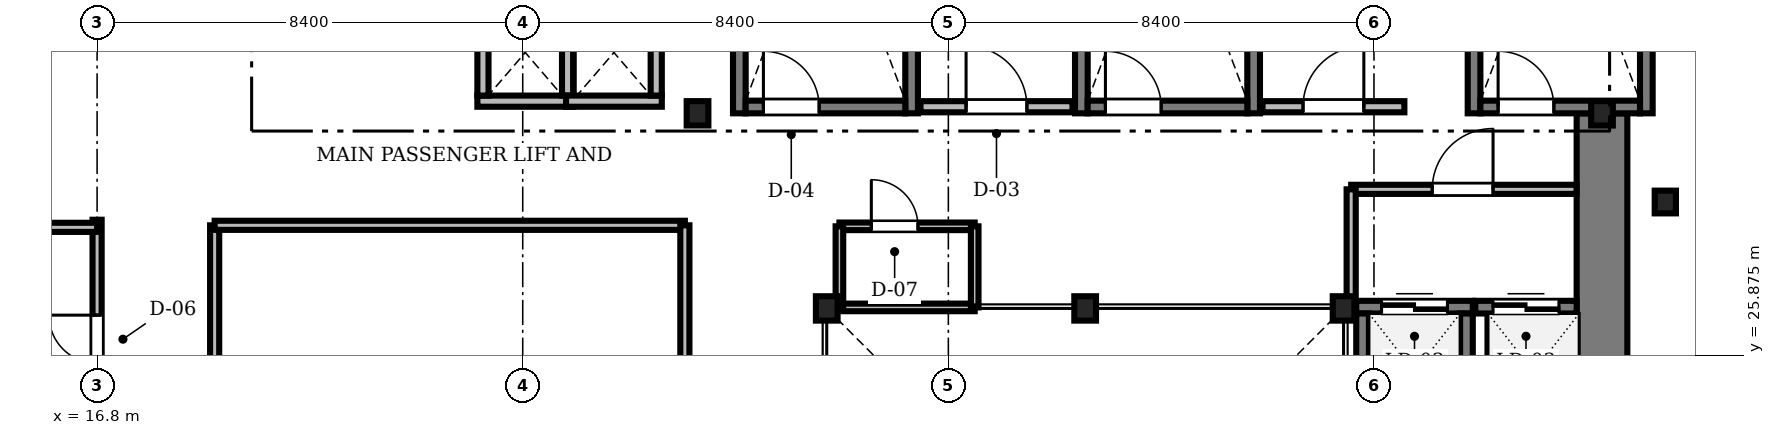
"""IFC4 building model, lengths in metres.
Left out: names, types, materials, properties, quantities, classifications, styles, units other than length and angle.
Written with IfcOpenShell. Run it as: python <this file> out.ifc"""

import sys

from ifc_helpers import new_model, si_unit, direction, frame, frame_2d, origin, origin_2d, place, context, subcontext, project, spatial, rectangle, i_section, extrude, source, transform, mapped, element, fill, save


model = new_model("IFC4")
c1 = context("Model", 3, precision=1e-05, world=origin(), true_north=direction((0.0, 1.0)))
c2 = subcontext(c1, "Body", "Model", "MODEL_VIEW")
j1 = project(units=[si_unit("LENGTHUNIT", "METRE"), si_unit("PLANEANGLEUNIT", "RADIAN")], contexts=[c1])
p1 = place(None, origin())
s1 = spatial("IfcSite", under=j1, at=p1, CompositionType="ELEMENT")
p2 = place(p1, origin())
s2 = spatial("IfcBuilding", under=s1, at=p2, CompositionType="ELEMENT")
p3 = place(p2, frame((0.0, 0.0, 53.15)))
s3 = spatial("IfcBuildingStorey", under=s2, at=p3, CompositionType="ELEMENT", Elevation=53.15)
m1 = source(origin(), c2, "Body", "SweptSolid", [
    extrude(rectangle(XDim=13.15, YDim=1.0, at=frame_2d((6.575, 0.0))), origin(), (0.0, 0.0, 1.0), 3.41),
])
p4 = place(p3, frame((46.5, 17.5, 0.0), z_axis=(0.0, 0.0, 1.0), x_axis=(0.0, 1.0, 0.0)))
e1 = element("IfcWall", 1, at=p4, inside=s3, PredefinedType="SHEAR", context=c2, shape_type="MappedRepresentation", body=[
    mapped(m1, transform((0.0, 0.0, 0.0), scale=1.0)),
])
m2 = source(origin(), c2, "Body", "SweptSolid", [
    extrude(i_section(OverallWidth=0.428, OverallDepth=0.481, WebThickness=0.04, FlangeThickness=0.063, FilletRadius=0.015, at=origin_2d()), origin(), (0.0, 0.0, 1.0), 3.41),
])
for number, where, z_axis, x_axis in (
    (2, (41.4, 26.8, 0.0), (0.0, 0.0, 1.0), (1.0, 0.0, 0.0)),
    (3, (36.3, 26.8, 0.0), (0.0, 0.0, 1.0), (1.0, 0.0, 0.0)),
    (4, (31.2, 26.8, 0.0), (0.0, 0.0, 1.0), (1.0, 0.0, 0.0)),
    (5, (28.65, 30.65, 0.0), (0.0, 0.0, 1.0), (1.0, 0.0, 0.0)),
    (6, (46.5, 30.65, 0.0), (0.0, 0.0, 1.0), (1.0, 0.0, 0.0)),
):
    element("IfcColumn", number, at=place(p3, frame(where, z_axis=z_axis, x_axis=x_axis)), inside=s3, PredefinedType="COLUMN", context=c2, shape_type="MappedRepresentation", body=[
        mapped(m2, transform((0.0, 0.0, 0.0), scale=1.0)),
    ])
m3 = source(origin(), c2, "Body", "SweptSolid", [
    extrude(i_section(OverallWidth=0.419, OverallDepth=0.449, WebThickness=0.031, FlangeThickness=0.048, FilletRadius=0.015, at=origin_2d()), origin(), (0.0, 0.0, 1.0), 3.41),
])
p5 = place(p3, frame((47.75, 28.9, 0.0), z_axis=(0.0, 0.0, 1.0), x_axis=(1.0, 0.0, 0.0)))
e7 = element("IfcColumn", 7, at=p5, inside=s3, PredefinedType="COLUMN", context=c2, shape_type="MappedRepresentation", body=[
    mapped(m3, transform((0.0, 0.0, 0.0), scale=1.0)),
])
m4 = source(origin(), c2, "Body", "SweptSolid", [
    extrude(rectangle(XDim=9.15, YDim=0.25, at=frame_2d((4.575, 0.0))), origin(), (0.0, 0.0, 1.0), 3.45),
])
for number, where, z_axis, x_axis in (
    (8, (29.475, 30.65, 0.0), (0.0, 0.0, 1.0), (0.0, 1.0, 0.0)),
    (9, (32.875, 30.65, 0.0), (0.0, 0.0, 1.0), (0.0, 1.0, 0.0)),
):
    element("IfcWall", number, at=place(p3, frame(where, z_axis=z_axis, x_axis=x_axis)), inside=s3, PredefinedType="SOLIDWALL", context=c2, shape_type="MappedRepresentation", body=[
        mapped(m4, transform((0.0, 0.0, 0.0), scale=1.0)),
    ])
m5 = source(origin(), c2, "Body", "SweptSolid", [
    extrude(rectangle(XDim=3.15, YDim=0.25, at=frame_2d((1.575, 0.0))), origin(), (0.0, 0.0, 1.0), 3.45),
])
p6 = place(p3, frame((29.6, 30.775, 0.0), z_axis=(0.0, 0.0, 1.0), x_axis=(1.0, 0.0, 0.0)))
e10 = element("IfcWall", 10, at=p6, inside=s3, PredefinedType="SOLIDWALL", context=c2, shape_type="MappedRepresentation", body=[
    mapped(m5, transform((0.0, 0.0, 0.0), scale=1.0)),
])
m6 = source(origin(), c2, "Body", "SweptSolid", [
    extrude(rectangle(XDim=1.1, YDim=2.2, at=frame_2d((0.55, 1.1))), frame((0.0, 0.135, 0.0), z_axis=(0.0, -1.0, 0.0), x_axis=(1.0, 0.0, 0.0)), (0.0, 0.0, 1.0), 0.27),
])
p7 = place(p6, frame((0.35, 0.0, 0.0)))
e11 = element("IfcOpeningElement", 11, at=p7, cuts=e10, PredefinedType="OPENING", context=c2, shape_type="MappedRepresentation", body=[
    mapped(m6, transform((0.0, 0.0, 0.0), scale=1.0)),
])
for number, where, z_axis, x_axis in (
    (12, (36.225, 30.65, 0.0), (0.0, 0.0, 1.0), (0.0, 1.0, 0.0)),
    (13, (39.625, 30.65, 0.0), (0.0, 0.0, 1.0), (0.0, 1.0, 0.0)),
):
    element("IfcWall", number, at=place(p3, frame(where, z_axis=z_axis, x_axis=x_axis)), inside=s3, PredefinedType="SOLIDWALL", context=c2, shape_type="MappedRepresentation", body=[
        mapped(m4, transform((0.0, 0.0, 0.0), scale=1.0)),
    ])
p8 = place(p3, frame((36.35, 30.775, 0.0), z_axis=(0.0, 0.0, 1.0), x_axis=(1.0, 0.0, 0.0)))
e14 = element("IfcWall", 14, at=p8, inside=s3, PredefinedType="SOLIDWALL", context=c2, shape_type="MappedRepresentation", body=[
    mapped(m5, transform((0.0, 0.0, 0.0), scale=1.0)),
])
p9 = place(p8, frame((0.35, 0.0, 0.0)))
e15 = element("IfcOpeningElement", 15, at=p9, cuts=e14, PredefinedType="OPENING", context=c2, shape_type="MappedRepresentation", body=[
    mapped(m6, transform((0.0, 0.0, 0.0), scale=1.0)),
])
for number, where, z_axis, x_axis in (
    (16, (43.975, 30.65, 0.0), (0.0, 0.0, 1.0), (0.0, 1.0, 0.0)),
    (17, (47.375, 30.65, 0.0), (0.0, 0.0, 1.0), (0.0, 1.0, 0.0)),
):
    element("IfcWall", number, at=place(p3, frame(where, z_axis=z_axis, x_axis=x_axis)), inside=s3, PredefinedType="SOLIDWALL", context=c2, shape_type="MappedRepresentation", body=[
        mapped(m4, transform((0.0, 0.0, 0.0), scale=1.0)),
    ])
p10 = place(p3, frame((44.1, 30.775, 0.0), z_axis=(0.0, 0.0, 1.0), x_axis=(1.0, 0.0, 0.0)))
e18 = element("IfcWall", 18, at=p10, inside=s3, PredefinedType="SOLIDWALL", context=c2, shape_type="MappedRepresentation", body=[
    mapped(m5, transform((0.0, 0.0, 0.0), scale=1.0)),
])
p11 = place(p10, frame((0.35, 0.0, 0.0)))
e19 = element("IfcOpeningElement", 19, at=p11, cuts=e18, PredefinedType="OPENING", context=c2, shape_type="MappedRepresentation", body=[
    mapped(m6, transform((0.0, 0.0, 0.0), scale=1.0)),
])
m7 = source(origin(), c2, "Body", "SweptSolid", [
    extrude(rectangle(XDim=3.0, YDim=0.22, at=frame_2d((1.5, 0.0))), origin(), (0.0, 0.0, 1.0), 3.41),
])
p12 = place(p3, frame((33.05, 30.78, 0.0), z_axis=(0.0, 0.0, 1.0), x_axis=(1.0, 0.0, 0.0)))
e20 = element("IfcWall", 20, at=p12, inside=s3, PredefinedType="SOLIDWALL", context=c2, shape_type="MappedRepresentation", body=[
    mapped(m7, transform((0.0, 0.0, 0.0), scale=1.0)),
])
m8 = source(origin(), c2, "Body", "SweptSolid", [
    extrude(rectangle(XDim=1.2, YDim=2.2, at=frame_2d((0.6, 1.1))), frame((0.0, 0.12, 0.0), z_axis=(0.0, -1.0, 0.0), x_axis=(1.0, 0.0, 0.0)), (0.0, 0.0, 1.0), 0.24),
])
p13 = place(p12, frame((0.9, 0.0, 0.0)))
e21 = element("IfcOpeningElement", 21, at=p13, cuts=e20, PredefinedType="OPENING", context=c2, shape_type="MappedRepresentation", body=[
    mapped(m8, transform((0.0, 0.0, 0.0), scale=1.0)),
])
m9 = source(origin(), c2, "Body", "SweptSolid", [
    extrude(rectangle(XDim=2.8, YDim=0.22, at=frame_2d((1.4, 0.0))), origin(), (0.0, 0.0, 1.0), 3.41),
])
p14 = place(p3, frame((39.8, 30.78, 0.0), z_axis=(0.0, 0.0, 1.0), x_axis=(1.0, 0.0, 0.0)))
e22 = element("IfcWall", 22, at=p14, inside=s3, PredefinedType="SOLIDWALL", context=c2, shape_type="MappedRepresentation", body=[
    mapped(m9, transform((0.0, 0.0, 0.0), scale=1.0)),
])
p15 = place(p14, frame((0.8, 0.0, 0.0)))
e23 = element("IfcOpeningElement", 23, at=p15, cuts=e22, PredefinedType="OPENING", context=c2, shape_type="MappedRepresentation", body=[
    mapped(m8, transform((0.0, 0.0, 0.0), scale=1.0)),
])
m10 = source(origin(), c2, "Body", "SweptSolid", [
    extrude(rectangle(XDim=1.89, YDim=0.22, at=frame_2d((0.945, 0.0))), origin(), (0.0, 0.0, 1.0), 3.41),
])
p16 = place(p3, frame((24.305, 30.89, 0.0), z_axis=(0.0, 0.0, 1.0), x_axis=(1.0, 0.0, 0.0)))
e24 = element("IfcWall", 24, at=p16, inside=s3, PredefinedType="SOLIDWALL", context=c2, shape_type="MappedRepresentation", body=[
    mapped(m10, transform((0.0, 0.0, 0.0), scale=1.0)),
])
m11 = source(origin(), c2, "Body", "SweptSolid", [
    extrude(rectangle(XDim=1.7, YDim=0.22, at=frame_2d((0.85, 0.0))), origin(), (0.0, 0.0, 1.0), 3.41),
])
for number, where, z_axis, x_axis in (
    (25, (24.415, 31.0, 0.0), (0.0, 0.0, 1.0), (0.0, 1.0, 0.0)),
    (26, (26.085, 31.0, 0.0), (0.0, 0.0, 1.0), (0.0, 1.0, 0.0)),
):
    element("IfcWall", number, at=place(p3, frame(where, z_axis=z_axis, x_axis=x_axis)), inside=s3, PredefinedType="SOLIDWALL", context=c2, shape_type="MappedRepresentation", body=[
        mapped(m11, transform((0.0, 0.0, 0.0), scale=1.0)),
    ])
p17 = place(p3, frame((26.055, 30.89, 0.0), z_axis=(0.0, 0.0, 1.0), x_axis=(1.0, 0.0, 0.0)))
e27 = element("IfcWall", 27, at=p17, inside=s3, PredefinedType="SOLIDWALL", context=c2, shape_type="MappedRepresentation", body=[
    mapped(m10, transform((0.0, 0.0, 0.0), scale=1.0)),
])
p18 = place(p3, frame((27.835, 31.0, 0.0), z_axis=(0.0, 0.0, 1.0), x_axis=(0.0, 1.0, 0.0)))
e28 = element("IfcWall", 28, at=p18, inside=s3, PredefinedType="SOLIDWALL", context=c2, shape_type="MappedRepresentation", body=[
    mapped(m11, transform((0.0, 0.0, 0.0), scale=1.0)),
])
m12 = source(origin(), c2, "Body", "SweptSolid", [
    extrude(rectangle(XDim=2.3, YDim=0.25, at=frame_2d((1.15, 0.0))), origin(), (0.0, 0.0, 1.0), 3.41),
])
p19 = place(p3, frame((41.65, 26.825, 0.0), z_axis=(0.0, 0.0, 1.0), x_axis=(1.0, 0.0, 0.0)))
e29 = element("IfcWall", 29, at=p19, inside=s3, PredefinedType="SOLIDWALL", context=c2, shape_type="MappedRepresentation", body=[
    mapped(m12, transform((0.0, 0.0, 0.0), scale=1.0)),
])
m13 = source(origin(), c2, "Body", "SweptSolid", [
    extrude(rectangle(XDim=1.3, YDim=2.3, at=frame_2d((0.65, 1.15))), frame((0.0, 0.135, 0.0), z_axis=(0.0, -1.0, 0.0), x_axis=(1.0, 0.0, 0.0)), (0.0, 0.0, 1.0), 0.27),
])
p20 = place(p19, frame((0.5, 0.0, 0.0)))
e30 = element("IfcOpeningElement", 30, at=p20, cuts=e29, PredefinedType="OPENING", context=c2, shape_type="MappedRepresentation", body=[
    mapped(m13, transform((0.0, 0.0, 0.0), scale=1.0)),
])
for number, where, z_axis, x_axis in (
    (31, (41.775, 24.4, 0.0), (0.0, 0.0, 1.0), (0.0, 1.0, 0.0)),
    (32, (43.825, 24.4, 0.0), (0.0, 0.0, 1.0), (0.0, 1.0, 0.0)),
):
    element("IfcWall", number, at=place(p3, frame(where, z_axis=z_axis, x_axis=x_axis)), inside=s3, PredefinedType="SOLIDWALL", context=c2, shape_type="MappedRepresentation", body=[
        mapped(m12, transform((0.0, 0.0, 0.0), scale=1.0)),
    ])
m14 = source(origin(), c2, "Body", "SweptSolid", [
    extrude(rectangle(XDim=2.0, YDim=0.25, at=frame_2d((1.0, 0.0))), origin(), (0.0, 0.0, 1.0), 3.41),
])
p21 = place(p3, frame((44.0, 26.825, 0.0), z_axis=(0.0, 0.0, 1.0), x_axis=(1.0, 0.0, 0.0)))
e33 = element("IfcWall", 33, at=p21, inside=s3, PredefinedType="SOLIDWALL", context=c2, shape_type="MappedRepresentation", body=[
    mapped(m14, transform((0.0, 0.0, 0.0), scale=1.0)),
])
p22 = place(p21, frame((0.35, 0.0, 0.0)))
e34 = element("IfcOpeningElement", 34, at=p22, cuts=e33, PredefinedType="OPENING", context=c2, shape_type="MappedRepresentation", body=[
    mapped(m13, transform((0.0, 0.0, 0.0), scale=1.0)),
])
m15 = source(origin(), c2, "Body", "SweptSolid", [
    extrude(rectangle(XDim=13.7, YDim=0.18, at=frame_2d((6.85, 0.0))), origin(), (0.0, 0.0, 1.0), 2.802),
])
p23 = place(p3, frame((16.8, 14.85, 0.0), z_axis=(0.0, 0.0, 1.0), x_axis=(0.0, 1.0, 0.0)))
e35 = element("IfcWall", 35, at=p23, inside=s3, PredefinedType="PARTITIONING", context=c2, shape_type="MappedRepresentation", body=[
    mapped(m15, transform((0.0, 0.0, 0.0), scale=1.0)),
])
m16 = source(origin(), c2, "Body", "SweptSolid", [
    extrude(rectangle(XDim=1.05, YDim=2.2, at=frame_2d((0.525, 1.1))), frame((0.0, 0.1, 0.0), z_axis=(0.0, -1.0, 0.0), x_axis=(1.0, 0.0, 0.0)), (0.0, 0.0, 1.0), 0.2),
])
p24 = place(p23, frame((2.867, 0.0, 0.0)))
e36 = element("IfcOpeningElement", 36, at=p24, cuts=e35, PredefinedType="OPENING", context=c2, shape_type="MappedRepresentation", body=[
    mapped(m16, transform((0.0, 0.0, 0.0), scale=1.0)),
])
m17 = source(origin(), c2, "Body", "SweptSolid", [
    extrude(rectangle(XDim=0.95, YDim=2.15, at=frame_2d((0.475, 1.075))), frame((0.0, 0.1, 0.0), z_axis=(0.0, -1.0, 0.0), x_axis=(1.0, 0.0, 0.0)), (0.0, 0.0, 1.0), 0.2),
])
p25 = place(p23, frame((10.867, 0.0, 0.0)))
e37 = element("IfcOpeningElement", 37, at=p25, cuts=e35, PredefinedType="OPENING", context=c2, shape_type="MappedRepresentation", body=[
    mapped(m17, transform((0.0, 0.0, 0.0), scale=1.0)),
])
m18 = source(origin(), c2, "Body", "SweptSolid", [
    extrude(rectangle(XDim=6.54, YDim=0.18, at=frame_2d((3.27, 0.0))), origin(), (0.0, 0.0, 1.0), 2.802),
])
p26 = place(p3, frame((19.12, 21.9, 0.0), z_axis=(0.0, 0.0, 1.0), x_axis=(0.0, 1.0, 0.0)))
e38 = element("IfcWall", 38, at=p26, inside=s3, PredefinedType="PARTITIONING", context=c2, shape_type="MappedRepresentation", body=[
    mapped(m18, transform((0.0, 0.0, 0.0), scale=1.0)),
])
p27 = place(p26, frame((2.2, 0.0, 0.0)))
e39 = element("IfcOpeningElement", 39, at=p27, cuts=e38, PredefinedType="OPENING", context=c2, shape_type="MappedRepresentation", body=[
    mapped(m16, transform((0.0, 0.0, 0.0), scale=1.0)),
])
m19 = source(origin(), c2, "Body", "SweptSolid", [
    extrude(rectangle(XDim=4.448, YDim=0.18, at=frame_2d((2.224, 0.0))), origin(), (0.0, 0.0, 1.0), 3.042),
])
p28 = place(p3, frame((41.55, 29.15, 0.0), z_axis=(0.0, 0.0, 1.0), x_axis=(1.0, 0.0, 0.0)))
e40 = element("IfcWall", 40, at=p28, inside=s3, PredefinedType="PARTITIONING", context=c2, shape_type="MappedRepresentation", body=[
    mapped(m19, transform((0.0, 0.0, 0.0), scale=1.0)),
])
m20 = source(origin(), c2, "Body", "SweptSolid", [
    extrude(rectangle(XDim=1.2, YDim=2.2, at=frame_2d((0.6, 1.1))), frame((0.0, 0.1, 0.0), z_axis=(0.0, -1.0, 0.0), x_axis=(1.0, 0.0, 0.0)), (0.0, 0.0, 1.0), 0.2),
])
p29 = place(p28, frame((1.6, 0.0, 0.0)))
e41 = element("IfcOpeningElement", 41, at=p29, cuts=e40, PredefinedType="OPENING", context=c2, shape_type="MappedRepresentation", body=[
    mapped(m20, transform((0.0, 0.0, 0.0), scale=1.0)),
])
m21 = source(origin(), c2, "Body", "SweptSolid", [
    extrude(rectangle(XDim=2.67, YDim=0.15, at=frame_2d((1.335, 0.0))), origin(), (0.0, 0.0, 1.0), 3.042),
])
p30 = place(p3, frame((31.45, 28.42, 0.0), z_axis=(0.0, 0.0, 1.0), x_axis=(1.0, 0.0, 0.0)))
e42 = element("IfcWall", 42, at=p30, inside=s3, PredefinedType="PARTITIONING", context=c2, shape_type="MappedRepresentation", body=[
    mapped(m21, transform((0.0, 0.0, 0.0), scale=1.0)),
])
m22 = source(origin(), c2, "Body", "SweptSolid", [
    extrude(rectangle(XDim=0.92, YDim=2.1, at=frame_2d((0.46, 1.05))), frame((0.0, 0.085, 0.0), z_axis=(0.0, -1.0, 0.0), x_axis=(1.0, 0.0, 0.0)), (0.0, 0.0, 1.0), 0.17),
])
p31 = place(p30, frame((0.63, 0.0, 0.0)))
e43 = element("IfcOpeningElement", 43, at=p31, cuts=e42, PredefinedType="OPENING", context=c2, shape_type="MappedRepresentation", body=[
    mapped(m22, transform((0.0, 0.0, 0.0), scale=1.0)),
])
m23 = source(origin(), c2, "Body", "SweptSolid", [
    extrude(rectangle(XDim=14.57, YDim=0.18, at=frame_2d((7.285, 0.0))), origin(), (0.0, 0.0, 1.0), 2.652),
])
p32 = place(p3, frame((2.23, 28.4, 0.0), z_axis=(0.0, 0.0, 1.0), x_axis=(1.0, 0.0, 0.0)))
e44 = element("IfcWall", 44, at=p32, inside=s3, PredefinedType="PARTITIONING", context=c2, shape_type="MappedRepresentation", body=[
    mapped(m23, transform((0.0, 0.0, 0.0), scale=1.0)),
])
m24 = source(origin(), c2, "Body", "SweptSolid", [
    extrude(rectangle(XDim=9.28, YDim=0.18, at=frame_2d((4.64, 0.0))), origin(), (0.0, 0.0, 1.0), 3.41),
])
p33 = place(p3, frame((19.12, 28.44, 0.0), z_axis=(0.0, 0.0, 1.0), x_axis=(1.0, 0.0, 0.0)))
e45 = element("IfcWall", 45, at=p33, inside=s3, PredefinedType="PARTITIONING", context=c2, shape_type="MappedRepresentation", body=[
    mapped(m24, transform((0.0, 0.0, 0.0), scale=1.0)),
])
p34 = place(p3, frame((28.4, 21.9, 0.0), z_axis=(0.0, 0.0, 1.0), x_axis=(0.0, 1.0, 0.0)))
e46 = element("IfcWall", 46, at=p34, inside=s3, PredefinedType="PARTITIONING", context=c2, shape_type="MappedRepresentation", body=[
    mapped(m18, transform((0.0, 0.0, 0.0), scale=1.0)),
])
m25 = source(origin(), c2, "Body", "SweptSolid", [
    extrude(rectangle(XDim=2.67, YDim=0.15, at=frame_2d((1.335, 0.0))), origin(), (0.0, 0.0, 1.0), 2.952),
])
p35 = place(p3, frame((31.45, 26.82, 0.0), z_axis=(0.0, 0.0, 1.0), x_axis=(1.0, 0.0, 0.0)))
e47 = element("IfcWall", 47, at=p35, inside=s3, PredefinedType="PARTITIONING", context=c2, shape_type="MappedRepresentation", body=[
    mapped(m25, transform((0.0, 0.0, 0.0), scale=1.0)),
])
m26 = source(origin(), c2, "Body", "SweptSolid", [
    extrude(rectangle(XDim=2.35, YDim=0.18, at=frame_2d((1.175, 0.0))), origin(), (0.0, 0.0, 1.0), 2.802),
])
p36 = place(p3, frame((41.55, 26.8, 0.0), z_axis=(0.0, 0.0, 1.0), x_axis=(0.0, 1.0, 0.0)))
e48 = element("IfcWall", 48, at=p36, inside=s3, PredefinedType="PARTITIONING", context=c2, shape_type="MappedRepresentation", body=[
    mapped(m26, transform((0.0, 0.0, 0.0), scale=1.0)),
])
m27 = source(origin(), c2, "Body", "SweptSolid", [
    extrude(rectangle(XDim=1.6, YDim=0.15, at=frame_2d((0.8, 0.0))), origin(), (0.0, 0.0, 1.0), 2.952),
])
for number, where, z_axis, x_axis in (
    (49, (31.45, 26.82, 0.0), (0.0, 0.0, 1.0), (0.0, 1.0, 0.0)),
    (50, (34.12, 26.82, 0.0), (0.0, 0.0, 1.0), (0.0, 1.0, 0.0)),
):
    element("IfcWall", number, at=place(p3, frame(where, z_axis=z_axis, x_axis=x_axis)), inside=s3, PredefinedType="PARTITIONING", context=c2, shape_type="MappedRepresentation", body=[
        mapped(m27, transform((0.0, 0.0, 0.0), scale=1.0)),
    ])
m28 = source(origin(), c2, "Body", "SweptSolid", [
    extrude(rectangle(XDim=1.1, YDim=2.2, at=frame_2d((0.55, 1.1))), frame((0.0, 0.025, 0.0), z_axis=(0.0, -1.0, 0.0), x_axis=(1.0, 0.0, 0.0)), (0.0, 0.0, 1.0), 0.05),
])
p37 = place(p7, origin())
e51 = element("IfcDoor", 51, at=p37, inside=s3, OperationType="SINGLE_SWING_LEFT", PredefinedType="DOOR", context=c2, shape_type="MappedRepresentation", body=[
    mapped(m28, transform((0.0, 0.0, 0.0), scale=1.0)),
])
fill(e11, e51)
p38 = place(p9, origin())
e52 = element("IfcDoor", 52, at=p38, inside=s3, OperationType="SINGLE_SWING_LEFT", PredefinedType="DOOR", context=c2, shape_type="MappedRepresentation", body=[
    mapped(m28, transform((0.0, 0.0, 0.0), scale=1.0)),
])
fill(e15, e52)
p39 = place(p11, origin())
e53 = element("IfcDoor", 53, at=p39, inside=s3, OperationType="SINGLE_SWING_LEFT", PredefinedType="DOOR", context=c2, shape_type="MappedRepresentation", body=[
    mapped(m28, transform((0.0, 0.0, 0.0), scale=1.0)),
])
fill(e19, e53)
m29 = source(origin(), c2, "Body", "SweptSolid", [
    extrude(rectangle(XDim=1.2, YDim=2.2, at=frame_2d((0.6, 1.1))), frame((0.0, 0.025, 0.0), z_axis=(0.0, -1.0, 0.0), x_axis=(1.0, 0.0, 0.0)), (0.0, 0.0, 1.0), 0.05),
])
p40 = place(p13, origin())
e54 = element("IfcDoor", 54, at=p40, inside=s3, OperationType="SINGLE_SWING_LEFT", PredefinedType="DOOR", context=c2, shape_type="MappedRepresentation", body=[
    mapped(m29, transform((0.0, 0.0, 0.0), scale=1.0)),
])
fill(e21, e54)
p41 = place(p15, origin())
e55 = element("IfcDoor", 55, at=p41, inside=s3, OperationType="SINGLE_SWING_RIGHT", PredefinedType="DOOR", context=c2, shape_type="MappedRepresentation", body=[
    mapped(m29, transform((0.0, 0.0, 0.0), scale=1.0)),
])
fill(e23, e55)
m30 = source(origin(), c2, "Body", "SweptSolid", [
    extrude(rectangle(XDim=1.3, YDim=2.3, at=frame_2d((0.65, 1.15))), frame((0.0, 0.025, 0.0), z_axis=(0.0, -1.0, 0.0), x_axis=(1.0, 0.0, 0.0)), (0.0, 0.0, 1.0), 0.05),
])
p42 = place(p20, origin())
e56 = element("IfcDoor", 56, at=p42, inside=s3, OperationType="DOUBLE_DOOR_SLIDING", PredefinedType="DOOR", context=c2, shape_type="MappedRepresentation", body=[
    mapped(m30, transform((0.0, 0.0, 0.0), scale=1.0)),
])
fill(e30, e56)
p43 = place(p22, origin())
e57 = element("IfcDoor", 57, at=p43, inside=s3, OperationType="DOUBLE_DOOR_SLIDING", PredefinedType="DOOR", context=c2, shape_type="MappedRepresentation", body=[
    mapped(m30, transform((0.0, 0.0, 0.0), scale=1.0)),
])
fill(e34, e57)
m31 = source(origin(), c2, "Body", "SweptSolid", [
    extrude(rectangle(XDim=0.95, YDim=2.15, at=frame_2d((0.475, 1.075))), frame((0.0, 0.025, 0.0), z_axis=(0.0, -1.0, 0.0), x_axis=(1.0, 0.0, 0.0)), (0.0, 0.0, 1.0), 0.05),
])
p44 = place(p25, origin())
e58 = element("IfcDoor", 58, at=p44, inside=s3, OperationType="SINGLE_SWING_RIGHT", PredefinedType="DOOR", context=c2, shape_type="MappedRepresentation", body=[
    mapped(m31, transform((0.0, 0.0, 0.0), scale=1.0)),
])
fill(e37, e58)
p45 = place(p29, origin())
e59 = element("IfcDoor", 59, at=p45, inside=s3, OperationType="SINGLE_SWING_RIGHT", PredefinedType="DOOR", context=c2, shape_type="MappedRepresentation", body=[
    mapped(m29, transform((0.0, 0.0, 0.0), scale=1.0)),
])
fill(e41, e59)
m32 = source(origin(), c2, "Body", "SweptSolid", [
    extrude(rectangle(XDim=0.92, YDim=2.1, at=frame_2d((0.46, 1.05))), frame((0.0, 0.025, 0.0), z_axis=(0.0, -1.0, 0.0), x_axis=(1.0, 0.0, 0.0)), (0.0, 0.0, 1.0), 0.05),
])
p46 = place(p31, origin())
e60 = element("IfcDoor", 60, at=p46, inside=s3, OperationType="SINGLE_SWING_LEFT", PredefinedType="DOOR", context=c2, shape_type="MappedRepresentation", body=[
    mapped(m32, transform((0.0, 0.0, 0.0), scale=1.0)),
])
fill(e43, e60)
save(model, sys.argv[1])
